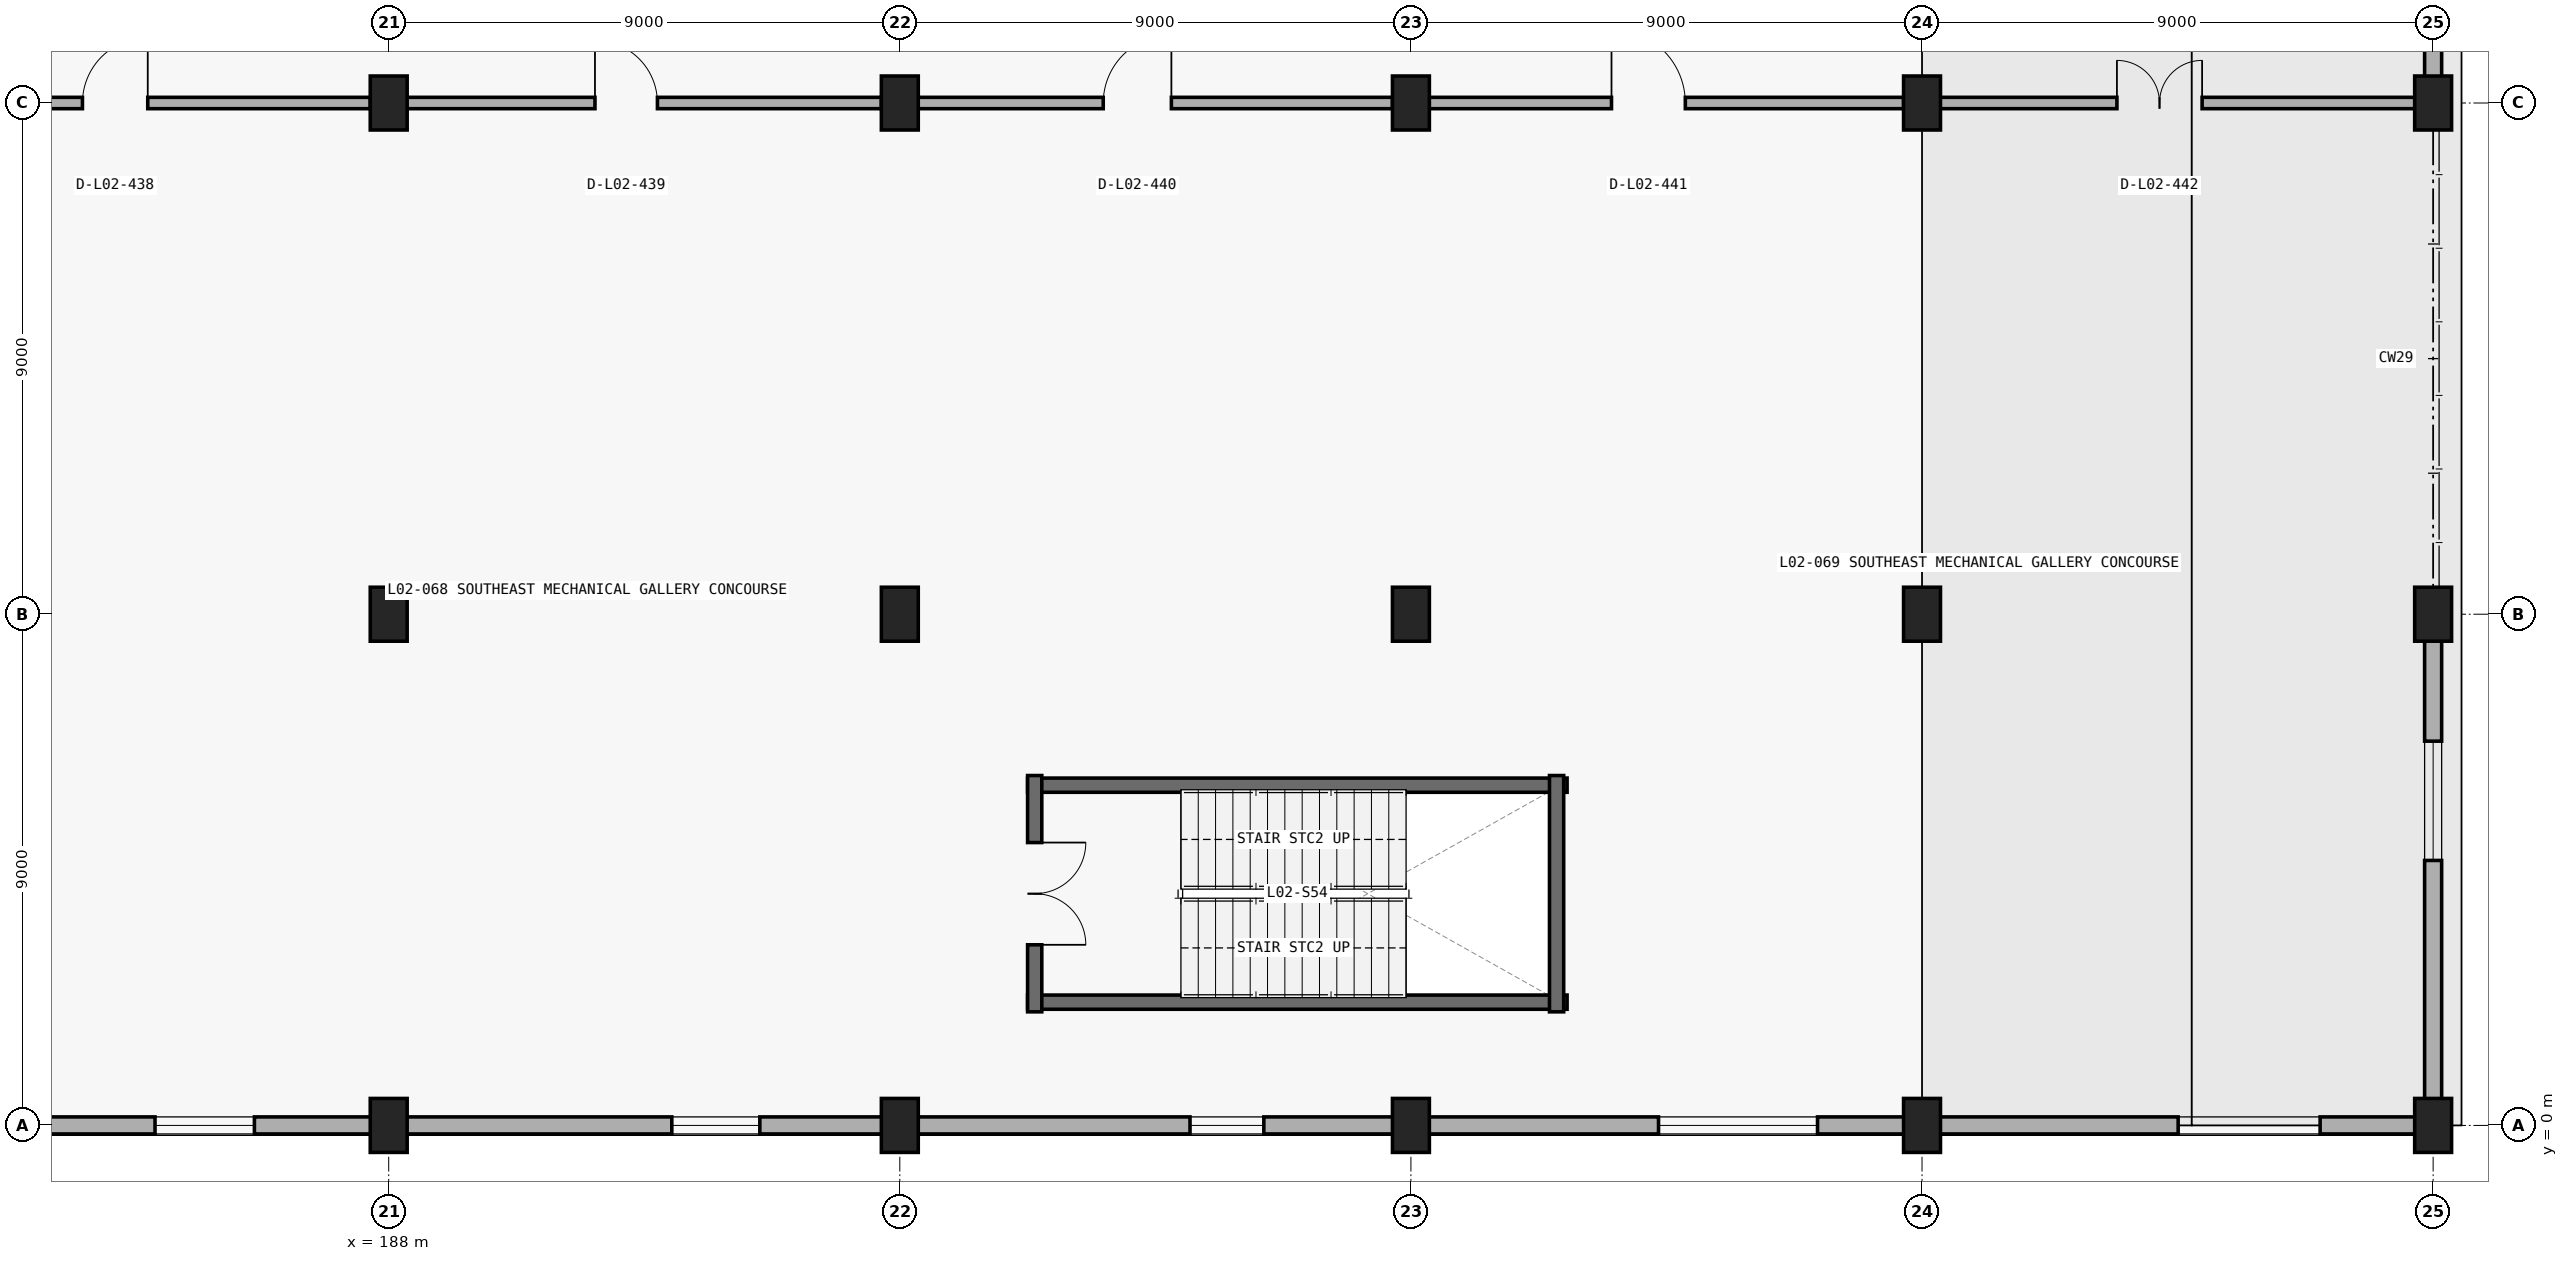
"""IFC4 building model, lengths in metres.
Left out: names, types, materials, properties, quantities, classifications, styles, units other than length and angle.
Written with IfcOpenShell. Run it as: python <this file> out.ifc"""

import sys

from ifc_helpers import new_model, si_unit, direction, frame, frame_2d, origin, origin_2d, place, context, subcontext, project, spatial, rectangle, extrude, element, fill, save


model = new_model("IFC4")
c1 = context("Model", 3, precision=1e-05, world=origin(), true_north=direction((0.0, 1.0)))
c2 = subcontext(c1, "Body", "Model", "MODEL_VIEW")
j1 = project(units=[si_unit("LENGTHUNIT", "METRE"), si_unit("PLANEANGLEUNIT", "RADIAN")], contexts=[c1])
p1 = place(None, origin())
s1 = spatial("IfcSite", under=j1, at=p1, CompositionType="ELEMENT")
p2 = place(p1, origin())
s2 = spatial("IfcBuilding", under=s1, at=p2, CompositionType="ELEMENT")
p3 = place(p2, frame((0.0, 0.0, 10.2)))
s3 = spatial("IfcBuildingStorey", under=s2, at=p3, CompositionType="ELEMENT", Elevation=10.2)
for number, where, z_axis, x_axis in (
    (1, (188.0, 0.0, 0.0), (0.0, 0.0, 1.0), (1.0, 0.0, 0.0)),
    (2, (188.0, 9.0, 0.0), (0.0, 0.0, 1.0), (1.0, 0.0, 0.0)),
    (3, (188.0, 18.0, 0.0), (0.0, 0.0, 1.0), (1.0, 0.0, 0.0)),
    (4, (197.0, 0.0, 0.0), (0.0, 0.0, 1.0), (1.0, 0.0, 0.0)),
    (5, (197.0, 9.0, 0.0), (0.0, 0.0, 1.0), (1.0, 0.0, 0.0)),
    (6, (197.0, 18.0, 0.0), (0.0, 0.0, 1.0), (1.0, 0.0, 0.0)),
    (7, (206.0, 0.0, 0.0), (0.0, 0.0, 1.0), (1.0, 0.0, 0.0)),
    (8, (206.0, 9.0, 0.0), (0.0, 0.0, 1.0), (1.0, 0.0, 0.0)),
    (9, (206.0, 18.0, 0.0), (0.0, 0.0, 1.0), (1.0, 0.0, 0.0)),
    (10, (215.0, 0.0, 0.0), (0.0, 0.0, 1.0), (1.0, 0.0, 0.0)),
    (11, (215.0, 9.0, 0.0), (0.0, 0.0, 1.0), (1.0, 0.0, 0.0)),
    (12, (215.0, 18.0, 0.0), (0.0, 0.0, 1.0), (1.0, 0.0, 0.0)),
    (13, (224.0, 0.0, 0.0), (0.0, 0.0, 1.0), (1.0, 0.0, 0.0)),
    (14, (224.0, 9.0, 0.0), (0.0, 0.0, 1.0), (1.0, 0.0, 0.0)),
    (15, (224.0, 18.0, 0.0), (0.0, 0.0, 1.0), (1.0, 0.0, 0.0)),
):
    element("IfcColumn", number, at=place(p3, frame(where, z_axis=z_axis, x_axis=x_axis)), inside=s3, PredefinedType="COLUMN", context=c2, shape_type="SweptSolid", body=[
        extrude(rectangle(XDim=0.65, YDim=0.95, at=origin_2d()), origin(), (0.0, 0.0, 1.0), 4.8),
    ])
p4 = place(p3, frame((223.7, 0.0, 0.0), z_axis=(0.0, 0.0, 1.0), x_axis=(-1.0, 0.0, 0.0)))
e16 = element("IfcWall", 16, at=p4, inside=s3, PredefinedType="STANDARD", context=c2, shape_type="SweptSolid", body=[
    extrude(rectangle(XDim=8.4, YDim=0.3, at=frame_2d((4.2, 0.0))), origin(), (0.0, 0.0, 1.0), 3.855),
])
p5 = place(p4, frame((1.69, 0.0, 0.95)))
e17 = element("IfcOpeningElement", 17, at=p5, cuts=e16, PredefinedType="OPENING", context=c2, shape_type="SweptSolid", body=[
    extrude(rectangle(XDim=2.5, YDim=2.3, at=frame_2d((1.25, 1.15))), frame((0.0, 0.16, 0.0), z_axis=(0.0, -1.0, 0.0), x_axis=(1.0, 0.0, 0.0)), (0.0, 0.0, 1.0), 0.32),
])
p6 = place(p3, frame((214.7, 0.0, 0.0), z_axis=(0.0, 0.0, 1.0), x_axis=(-1.0, 0.0, 0.0)))
e18 = element("IfcWall", 18, at=p6, inside=s3, PredefinedType="STANDARD", context=c2, shape_type="SweptSolid", body=[
    extrude(rectangle(XDim=8.4, YDim=0.3, at=frame_2d((4.2, 0.0))), origin(), (0.0, 0.0, 1.0), 3.855),
])
p7 = place(p6, frame((1.54, 0.0, 0.95)))
e19 = element("IfcOpeningElement", 19, at=p7, cuts=e18, PredefinedType="OPENING", context=c2, shape_type="SweptSolid", body=[
    extrude(rectangle(XDim=2.8, YDim=2.4, at=frame_2d((1.4, 1.2))), frame((0.0, 0.16, 0.0), z_axis=(0.0, -1.0, 0.0), x_axis=(1.0, 0.0, 0.0)), (0.0, 0.0, 1.0), 0.32),
])
p8 = place(p3, frame((205.7, 0.0, 0.0), z_axis=(0.0, 0.0, 1.0), x_axis=(-1.0, 0.0, 0.0)))
e20 = element("IfcWall", 20, at=p8, inside=s3, PredefinedType="STANDARD", context=c2, shape_type="SweptSolid", body=[
    extrude(rectangle(XDim=8.4, YDim=0.3, at=frame_2d((4.2, 0.0))), origin(), (0.0, 0.0, 1.0), 3.855),
])
p9 = place(p8, frame((2.29, 0.0, 0.95)))
e21 = element("IfcOpeningElement", 21, at=p9, cuts=e20, PredefinedType="OPENING", context=c2, shape_type="SweptSolid", body=[
    extrude(rectangle(XDim=1.3, YDim=1.75, at=frame_2d((0.65, 0.875))), frame((0.0, 0.16, 0.0), z_axis=(0.0, -1.0, 0.0), x_axis=(1.0, 0.0, 0.0)), (0.0, 0.0, 1.0), 0.32),
])
p10 = place(p3, frame((196.7, 0.0, 0.0), z_axis=(0.0, 0.0, 1.0), x_axis=(-1.0, 0.0, 0.0)))
e22 = element("IfcWall", 22, at=p10, inside=s3, PredefinedType="STANDARD", context=c2, shape_type="SweptSolid", body=[
    extrude(rectangle(XDim=8.4, YDim=0.3, at=frame_2d((4.2, 0.0))), origin(), (0.0, 0.0, 1.0), 3.855),
])
p11 = place(p10, frame((2.165, 0.0, 0.95)))
e23 = element("IfcOpeningElement", 23, at=p11, cuts=e22, PredefinedType="OPENING", context=c2, shape_type="SweptSolid", body=[
    extrude(rectangle(XDim=1.55, YDim=1.95, at=frame_2d((0.775, 0.975))), frame((0.0, 0.16, 0.0), z_axis=(0.0, -1.0, 0.0), x_axis=(1.0, 0.0, 0.0)), (0.0, 0.0, 1.0), 0.32),
])
p12 = place(p3, frame((187.7, 0.0, 0.0), z_axis=(0.0, 0.0, 1.0), x_axis=(-1.0, 0.0, 0.0)))
e24 = element("IfcWall", 24, at=p12, inside=s3, PredefinedType="STANDARD", context=c2, shape_type="SweptSolid", body=[
    extrude(rectangle(XDim=8.4, YDim=0.3, at=frame_2d((4.2, 0.0))), origin(), (0.0, 0.0, 1.0), 3.855),
])
p13 = place(p12, frame((2.065, 0.0, 0.95)))
e25 = element("IfcOpeningElement", 25, at=p13, cuts=e24, PredefinedType="OPENING", context=c2, shape_type="SweptSolid", body=[
    extrude(rectangle(XDim=1.75, YDim=2.1, at=frame_2d((0.875, 1.05))), frame((0.0, 0.16, 0.0), z_axis=(0.0, -1.0, 0.0), x_axis=(1.0, 0.0, 0.0)), (0.0, 0.0, 1.0), 0.32),
])
p14 = place(p3, frame((224.0, 26.55, 0.0), z_axis=(0.0, 0.0, 1.0), x_axis=(0.0, -1.0, 0.0)))
e26 = element("IfcWall", 26, at=p14, inside=s3, PredefinedType="STANDARD", context=c2, shape_type="SweptSolid", body=[
    extrude(rectangle(XDim=8.1, YDim=0.3, at=frame_2d((4.05, 0.0))), origin(), (0.0, 0.0, 1.0), 3.817),
])
p15 = place(p14, frame((2.235, 0.0, 0.95)))
e27 = element("IfcOpeningElement", 27, at=p15, cuts=e26, PredefinedType="OPENING", context=c2, shape_type="SweptSolid", body=[
    extrude(rectangle(XDim=1.2, YDim=1.8, at=frame_2d((0.6, 0.9))), frame((0.0, 0.16, 0.0), z_axis=(0.0, -1.0, 0.0), x_axis=(1.0, 0.0, 0.0)), (0.0, 0.0, 1.0), 0.32),
])
p16 = place(p3, frame((224.0, 8.55, 0.0), z_axis=(0.0, 0.0, 1.0), x_axis=(0.0, -1.0, 0.0)))
e28 = element("IfcWall", 28, at=p16, inside=s3, PredefinedType="STANDARD", context=c2, shape_type="SweptSolid", body=[
    extrude(rectangle(XDim=8.1, YDim=0.3, at=frame_2d((4.05, 0.0))), origin(), (0.0, 0.0, 1.0), 3.817),
])
p17 = place(p16, frame((1.785, 0.0, 0.95)))
e29 = element("IfcOpeningElement", 29, at=p17, cuts=e28, PredefinedType="OPENING", context=c2, shape_type="SweptSolid", body=[
    extrude(rectangle(XDim=2.1, YDim=2.1, at=frame_2d((1.05, 1.05))), frame((0.0, 0.16, 0.0), z_axis=(0.0, -1.0, 0.0), x_axis=(1.0, 0.0, 0.0)), (0.0, 0.0, 1.0), 0.32),
])
for number, where, z_axis, x_axis in (
    (30, (199.25, 2.17, 0.0), (0.0, 0.0, 1.0), (1.0, 0.0, 0.0)),
    (31, (208.75, 5.99, 0.0), (0.0, 0.0, 1.0), (-1.0, 0.0, 0.0)),
):
    element("IfcWall", number, at=place(p3, frame(where, z_axis=z_axis, x_axis=x_axis)), inside=s3, PredefinedType="SHEAR", context=c2, shape_type="SweptSolid", body=[
        extrude(rectangle(XDim=9.5, YDim=0.25, at=frame_2d((4.75, 0.0))), origin(), (0.0, 0.0, 1.0), 4.5),
    ])
p18 = place(p3, frame((199.375, 6.16, 0.0), z_axis=(0.0, 0.0, 1.0), x_axis=(0.0, -1.0, 0.0)))
e32 = element("IfcWall", 32, at=p18, inside=s3, PredefinedType="SHEAR", context=c2, shape_type="SweptSolid", body=[
    extrude(rectangle(XDim=4.16, YDim=0.25, at=frame_2d((2.08, 0.0))), origin(), (0.0, 0.0, 1.0), 4.5),
])
p19 = place(p18, frame((1.18, 0.0, 0.0)))
e33 = element("IfcOpeningElement", 33, at=p19, cuts=e32, PredefinedType="OPENING", context=c2, shape_type="SweptSolid", body=[
    extrude(rectangle(XDim=1.8, YDim=2.25, at=frame_2d((0.9, 1.125))), frame((0.0, 0.135, 0.0), z_axis=(0.0, -1.0, 0.0), x_axis=(1.0, 0.0, 0.0)), (0.0, 0.0, 1.0), 0.27),
])
p20 = place(p3, frame((208.565, 2.0, 0.0), z_axis=(0.0, 0.0, 1.0), x_axis=(0.0, 1.0, 0.0)))
e34 = element("IfcWall", 34, at=p20, inside=s3, PredefinedType="SHEAR", context=c2, shape_type="SweptSolid", body=[
    extrude(rectangle(XDim=4.16, YDim=0.25, at=frame_2d((2.08, 0.0))), origin(), (0.0, 0.0, 1.0), 4.5),
])
p21 = place(p3, frame((178.675, 18.0, 0.0), z_axis=(0.0, 0.0, 1.0), x_axis=(1.0, 0.0, 0.0)))
e35 = element("IfcWall", 35, at=p21, inside=s3, PredefinedType="PARTITIONING", context=c2, shape_type="SweptSolid", body=[
    extrude(rectangle(XDim=9.015, YDim=0.2, at=frame_2d((4.507, 0.0))), origin(), (0.0, 0.0, 1.0), 3.855),
])
p22 = place(p21, frame((3.932, 0.0, 0.0)))
e36 = element("IfcOpeningElement", 36, at=p22, cuts=e35, PredefinedType="OPENING", context=c2, shape_type="SweptSolid", body=[
    extrude(rectangle(XDim=1.15, YDim=2.2, at=frame_2d((0.575, 1.1))), frame((0.0, 0.11, 0.0), z_axis=(0.0, -1.0, 0.0), x_axis=(1.0, 0.0, 0.0)), (0.0, 0.0, 1.0), 0.22),
])
p23 = place(p3, frame((187.675, 18.0, 0.0), z_axis=(0.0, 0.0, 1.0), x_axis=(1.0, 0.0, 0.0)))
e37 = element("IfcWall", 37, at=p23, inside=s3, PredefinedType="PARTITIONING", context=c2, shape_type="SweptSolid", body=[
    extrude(rectangle(XDim=9.015, YDim=0.2, at=frame_2d((4.507, 0.0))), origin(), (0.0, 0.0, 1.0), 3.855),
])
p24 = place(p23, frame((3.957, 0.0, 0.0)))
e38 = element("IfcOpeningElement", 38, at=p24, cuts=e37, PredefinedType="OPENING", context=c2, shape_type="SweptSolid", body=[
    extrude(rectangle(XDim=1.1, YDim=2.15, at=frame_2d((0.55, 1.075))), frame((0.0, 0.11, 0.0), z_axis=(0.0, -1.0, 0.0), x_axis=(1.0, 0.0, 0.0)), (0.0, 0.0, 1.0), 0.22),
])
p25 = place(p3, frame((196.675, 18.0, 0.0), z_axis=(0.0, 0.0, 1.0), x_axis=(1.0, 0.0, 0.0)))
e39 = element("IfcWall", 39, at=p25, inside=s3, PredefinedType="PARTITIONING", context=c2, shape_type="SweptSolid", body=[
    extrude(rectangle(XDim=9.015, YDim=0.2, at=frame_2d((4.507, 0.0))), origin(), (0.0, 0.0, 1.0), 3.855),
])
p26 = place(p25, frame((3.907, 0.0, 0.0)))
e40 = element("IfcOpeningElement", 40, at=p26, cuts=e39, PredefinedType="OPENING", context=c2, shape_type="SweptSolid", body=[
    extrude(rectangle(XDim=1.2, YDim=2.25, at=frame_2d((0.6, 1.125))), frame((0.0, 0.11, 0.0), z_axis=(0.0, -1.0, 0.0), x_axis=(1.0, 0.0, 0.0)), (0.0, 0.0, 1.0), 0.22),
])
p27 = place(p3, frame((205.675, 18.0, 0.0), z_axis=(0.0, 0.0, 1.0), x_axis=(1.0, 0.0, 0.0)))
e41 = element("IfcWall", 41, at=p27, inside=s3, PredefinedType="PARTITIONING", context=c2, shape_type="SweptSolid", body=[
    extrude(rectangle(XDim=9.015, YDim=0.2, at=frame_2d((4.507, 0.0))), origin(), (0.0, 0.0, 1.0), 3.855),
])
p28 = place(p27, frame((3.857, 0.0, 0.0)))
e42 = element("IfcOpeningElement", 42, at=p28, cuts=e41, PredefinedType="OPENING", context=c2, shape_type="SweptSolid", body=[
    extrude(rectangle(XDim=1.3, YDim=2.25, at=frame_2d((0.65, 1.125))), frame((0.0, 0.11, 0.0), z_axis=(0.0, -1.0, 0.0), x_axis=(1.0, 0.0, 0.0)), (0.0, 0.0, 1.0), 0.22),
])
p29 = place(p3, frame((214.675, 18.0, 0.0), z_axis=(0.0, 0.0, 1.0), x_axis=(1.0, 0.0, 0.0)))
e43 = element("IfcWall", 43, at=p29, inside=s3, PredefinedType="PARTITIONING", context=c2, shape_type="SweptSolid", body=[
    extrude(rectangle(XDim=9.015, YDim=0.2, at=frame_2d((4.507, 0.0))), origin(), (0.0, 0.0, 1.0), 3.855),
])
p30 = place(p29, frame((3.757, 0.0, 0.0)))
e44 = element("IfcOpeningElement", 44, at=p30, cuts=e43, PredefinedType="OPENING", context=c2, shape_type="SweptSolid", body=[
    extrude(rectangle(XDim=1.5, YDim=2.15, at=frame_2d((0.75, 1.075))), frame((0.0, 0.11, 0.0), z_axis=(0.0, -1.0, 0.0), x_axis=(1.0, 0.0, 0.0)), (0.0, 0.0, 1.0), 0.22),
])
p31 = place(p5, origin())
e45 = element("IfcWindow", 45, at=p31, inside=s3, PartitioningType="SINGLE_PANEL", PredefinedType="WINDOW", context=c2, shape_type="SweptSolid", body=[
    extrude(rectangle(XDim=2.5, YDim=2.3, at=frame_2d((1.25, 1.15))), frame((0.0, 0.03, 0.0), z_axis=(0.0, -1.0, 0.0), x_axis=(1.0, 0.0, 0.0)), (0.0, 0.0, 1.0), 0.06),
])
fill(e17, e45)
p32 = place(p7, origin())
e46 = element("IfcWindow", 46, at=p32, inside=s3, PartitioningType="SINGLE_PANEL", PredefinedType="WINDOW", context=c2, shape_type="SweptSolid", body=[
    extrude(rectangle(XDim=2.8, YDim=2.4, at=frame_2d((1.4, 1.2))), frame((0.0, 0.03, 0.0), z_axis=(0.0, -1.0, 0.0), x_axis=(1.0, 0.0, 0.0)), (0.0, 0.0, 1.0), 0.06),
])
fill(e19, e46)
p33 = place(p9, origin())
e47 = element("IfcWindow", 47, at=p33, inside=s3, PartitioningType="SINGLE_PANEL", PredefinedType="WINDOW", context=c2, shape_type="SweptSolid", body=[
    extrude(rectangle(XDim=1.3, YDim=1.75, at=frame_2d((0.65, 0.875))), frame((0.0, 0.03, 0.0), z_axis=(0.0, -1.0, 0.0), x_axis=(1.0, 0.0, 0.0)), (0.0, 0.0, 1.0), 0.06),
])
fill(e21, e47)
p34 = place(p11, origin())
e48 = element("IfcWindow", 48, at=p34, inside=s3, PartitioningType="SINGLE_PANEL", PredefinedType="WINDOW", context=c2, shape_type="SweptSolid", body=[
    extrude(rectangle(XDim=1.55, YDim=1.95, at=frame_2d((0.775, 0.975))), frame((0.0, 0.03, 0.0), z_axis=(0.0, -1.0, 0.0), x_axis=(1.0, 0.0, 0.0)), (0.0, 0.0, 1.0), 0.06),
])
fill(e23, e48)
p35 = place(p13, origin())
e49 = element("IfcWindow", 49, at=p35, inside=s3, PartitioningType="SINGLE_PANEL", PredefinedType="WINDOW", context=c2, shape_type="SweptSolid", body=[
    extrude(rectangle(XDim=1.75, YDim=2.1, at=frame_2d((0.875, 1.05))), frame((0.0, 0.03, 0.0), z_axis=(0.0, -1.0, 0.0), x_axis=(1.0, 0.0, 0.0)), (0.0, 0.0, 1.0), 0.06),
])
fill(e25, e49)
p36 = place(p17, origin())
e50 = element("IfcWindow", 50, at=p36, inside=s3, PartitioningType="SINGLE_PANEL", PredefinedType="WINDOW", context=c2, shape_type="SweptSolid", body=[
    extrude(rectangle(XDim=2.1, YDim=2.1, at=frame_2d((1.05, 1.05))), frame((0.0, 0.03, 0.0), z_axis=(0.0, -1.0, 0.0), x_axis=(1.0, 0.0, 0.0)), (0.0, 0.0, 1.0), 0.06),
])
fill(e29, e50)
p37 = place(p19, origin())
e51 = element("IfcDoor", 51, at=p37, inside=s3, OperationType="DOUBLE_DOOR_SINGLE_SWING", PredefinedType="DOOR", context=c2, shape_type="SweptSolid", body=[
    extrude(rectangle(XDim=1.8, YDim=2.25, at=frame_2d((0.9, 1.125))), frame((0.0, 0.025, 0.0), z_axis=(0.0, -1.0, 0.0), x_axis=(1.0, 0.0, 0.0)), (0.0, 0.0, 1.0), 0.05),
])
fill(e33, e51)
p38 = place(p22, origin())
e52 = element("IfcDoor", 52, at=p38, inside=s3, OperationType="SINGLE_SWING_RIGHT", PredefinedType="DOOR", context=c2, shape_type="SweptSolid", body=[
    extrude(rectangle(XDim=1.15, YDim=2.2, at=frame_2d((0.575, 1.1))), frame((0.0, 0.025, 0.0), z_axis=(0.0, -1.0, 0.0), x_axis=(1.0, 0.0, 0.0)), (0.0, 0.0, 1.0), 0.05),
])
fill(e36, e52)
p39 = place(p24, origin())
e53 = element("IfcDoor", 53, at=p39, inside=s3, OperationType="SINGLE_SWING_LEFT", PredefinedType="DOOR", context=c2, shape_type="SweptSolid", body=[
    extrude(rectangle(XDim=1.1, YDim=2.15, at=frame_2d((0.55, 1.075))), frame((0.0, 0.025, 0.0), z_axis=(0.0, -1.0, 0.0), x_axis=(1.0, 0.0, 0.0)), (0.0, 0.0, 1.0), 0.05),
])
fill(e38, e53)
p40 = place(p26, origin())
e54 = element("IfcDoor", 54, at=p40, inside=s3, OperationType="SINGLE_SWING_RIGHT", PredefinedType="DOOR", context=c2, shape_type="SweptSolid", body=[
    extrude(rectangle(XDim=1.2, YDim=2.25, at=frame_2d((0.6, 1.125))), frame((0.0, 0.025, 0.0), z_axis=(0.0, -1.0, 0.0), x_axis=(1.0, 0.0, 0.0)), (0.0, 0.0, 1.0), 0.05),
])
fill(e40, e54)
p41 = place(p28, origin())
e55 = element("IfcDoor", 55, at=p41, inside=s3, OperationType="SINGLE_SWING_LEFT", PredefinedType="DOOR", context=c2, shape_type="SweptSolid", body=[
    extrude(rectangle(XDim=1.3, YDim=2.25, at=frame_2d((0.65, 1.125))), frame((0.0, 0.025, 0.0), z_axis=(0.0, -1.0, 0.0), x_axis=(1.0, 0.0, 0.0)), (0.0, 0.0, 1.0), 0.05),
])
fill(e42, e55)
p42 = place(p30, origin())
e56 = element("IfcDoor", 56, at=p42, inside=s3, OperationType="DOUBLE_DOOR_SINGLE_SWING", PredefinedType="DOOR", context=c2, shape_type="SweptSolid", body=[
    extrude(rectangle(XDim=1.5, YDim=2.15, at=frame_2d((0.75, 1.075))), frame((0.0, 0.025, 0.0), z_axis=(0.0, -1.0, 0.0), x_axis=(1.0, 0.0, 0.0)), (0.0, 0.0, 1.0), 0.05),
])
fill(e44, e56)
save(model, sys.argv[1])
